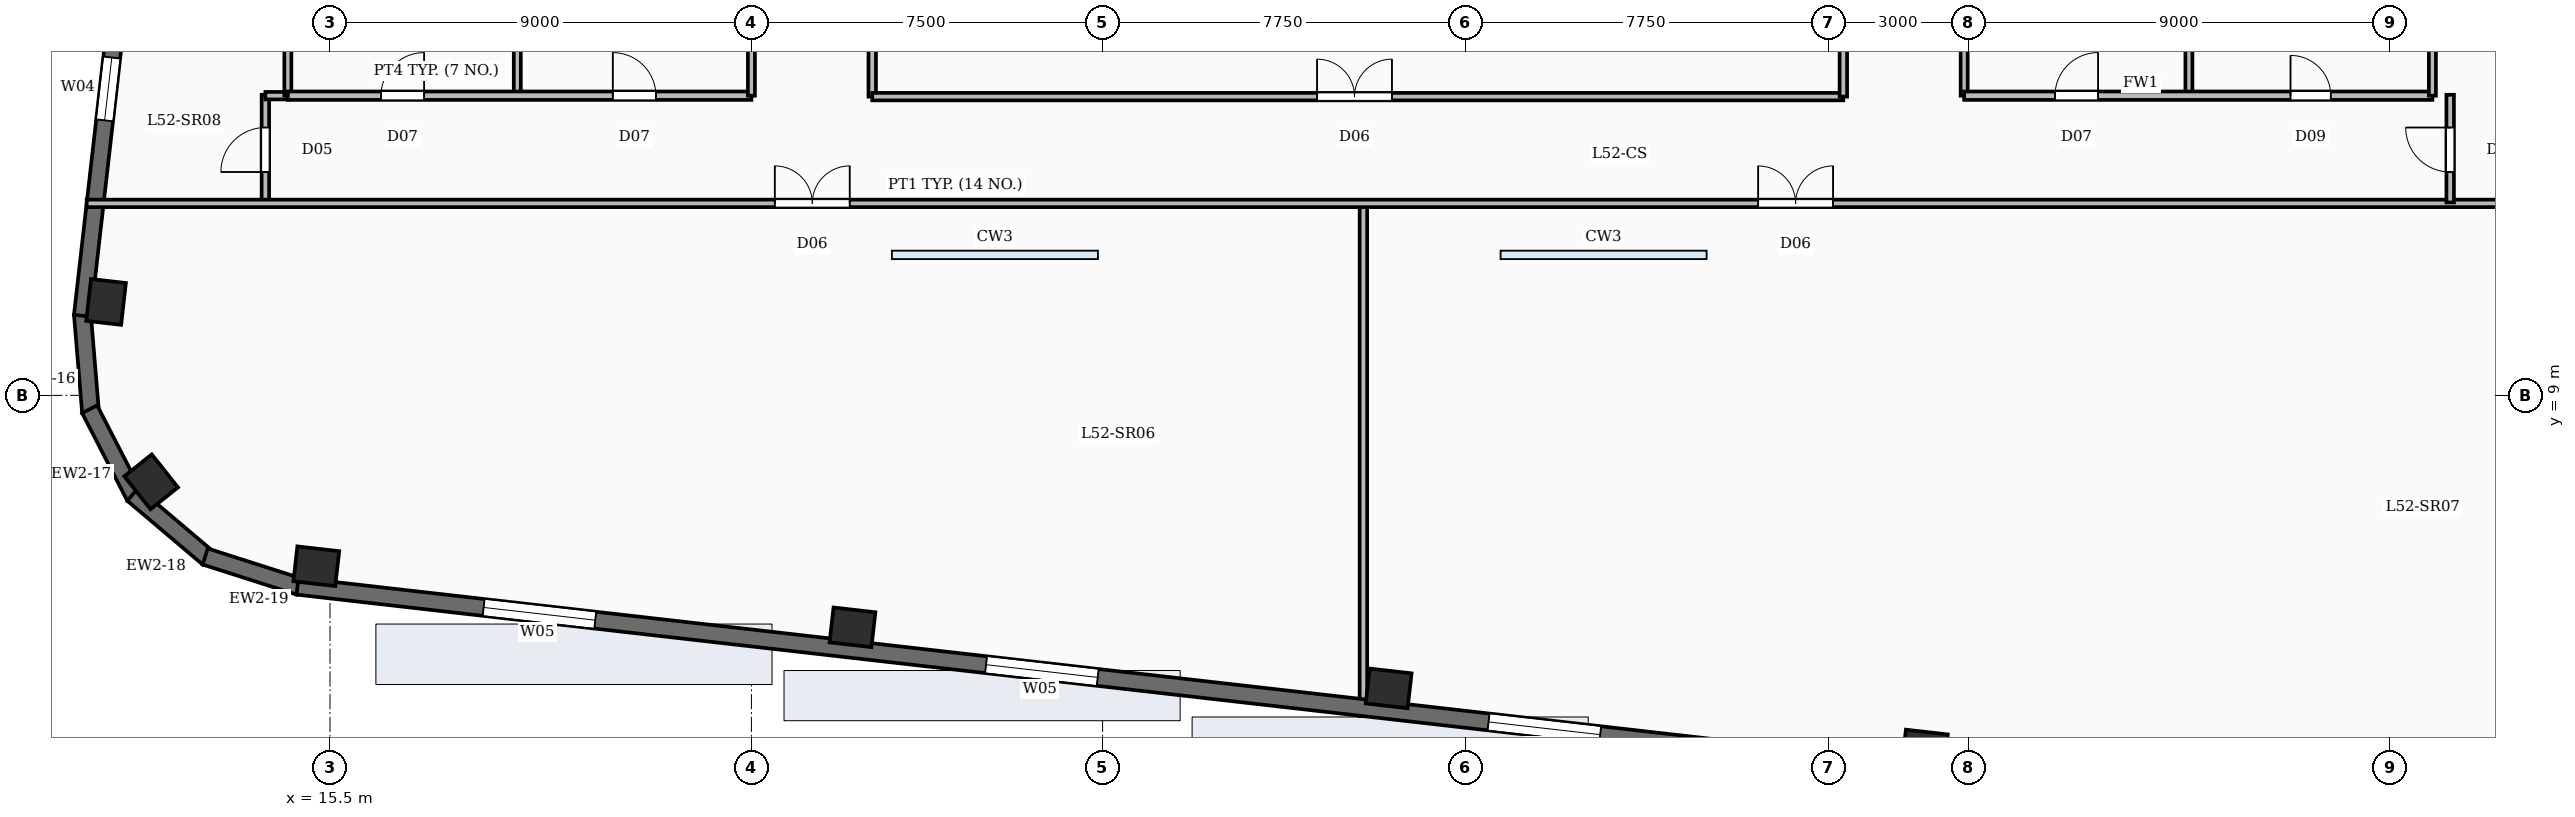
"""IFC4 building model, lengths in metres.
Left out: names, types, materials, properties, quantities, classifications, styles, units other than length and angle.
Written with IfcOpenShell. Run it as: python <this file> out.ifc"""

import sys

from ifc_helpers import new_model, si_unit, direction, frame, frame_2d, origin, origin_2d, place, context, subcontext, project, spatial, rectangle, extrude, element, fill, save


model = new_model("IFC4")
c1 = context("Model", 3, precision=1e-05, world=origin(), true_north=direction((0.0, 1.0)))
c2 = subcontext(c1, "Body", "Model", "MODEL_VIEW")
j1 = project(units=[si_unit("LENGTHUNIT", "METRE"), si_unit("PLANEANGLEUNIT", "RADIAN")], contexts=[c1])
p1 = place(None, origin())
s1 = spatial("IfcSite", under=j1, at=p1, CompositionType="ELEMENT")
p2 = place(p1, origin())
s2 = spatial("IfcBuilding", under=s1, at=p2, CompositionType="ELEMENT")
p3 = place(p2, frame((0.0, 0.0, 216.15)))
s3 = spatial("IfcBuildingStorey", under=s2, at=p3, CompositionType="ELEMENT", Elevation=216.15)
for number, where, z_axis, x_axis in (
    (1, (15.208, 5.351, -0.45), (0.0, 0.0, 1.0), (0.994, -0.113, 0.0)),
    (2, (26.659, 4.046, -0.45), (0.0, 0.0, 1.0), (0.994, -0.113, 0.0)),
    (3, (38.11, 2.741, -0.45), (0.0, 0.0, 1.0), (0.994, -0.113, 0.0)),
    (4, (49.56, 1.437, -0.45), (0.0, 0.0, 1.0), (0.994, -0.113, 0.0)),
    (5, (10.718, 10.995, -0.45), (0.0, 0.0, 1.0), (0.113, 0.994, 0.0)),
    (6, (11.68, 7.153, -0.45), (0.0, 0.0, 1.0), (-0.623, 0.783, 0.0)),
):
    element("IfcColumn", number, at=place(p3, frame(where, z_axis=z_axis, x_axis=x_axis)), inside=s3, PredefinedType="COLUMN", context=c2, shape_type="SweptSolid", body=[
        extrude(rectangle(XDim=0.9, YDim=0.75, at=origin_2d()), origin(), (0.0, 0.0, 1.0), 4.98),
    ])
p4 = place(p3, frame((10.211, 10.701, 0.0), z_axis=(0.0, 0.0, 1.0), x_axis=(0.113203107947, 0.993571867733, 0.0)))
e7 = element("IfcWall", 7, at=p4, inside=s3, PredefinedType="SOLIDWALL", context=c2, shape_type="SweptSolid", body=[
    extrude(rectangle(XDim=34.5, YDim=0.36, at=frame_2d((17.25, 0.0))), origin(), (0.0, 0.0, 1.0), 4.53),
])
p5 = place(p4, frame((4.2, 0.0, 0.88)))
e8 = element("IfcOpeningElement", 8, at=p5, cuts=e7, PredefinedType="OPENING", context=c2, shape_type="SweptSolid", body=[
    extrude(rectangle(XDim=1.35, YDim=2.2, at=frame_2d((0.675, 1.1))), frame((0.0, 0.19, 0.0), z_axis=(0.0, -1.0, 0.0), x_axis=(1.0, 0.0, 0.0)), (0.0, 0.0, 1.0), 0.38),
])
p6 = place(p4, frame((15.4, 0.0, 0.88)))
e9 = element("IfcOpeningElement", 9, at=p6, cuts=e7, PredefinedType="OPENING", context=c2, shape_type="SweptSolid", body=[
    extrude(rectangle(XDim=1.35, YDim=2.2, at=frame_2d((0.675, 1.1))), frame((0.0, 0.19, 0.0), z_axis=(0.0, -1.0, 0.0), x_axis=(1.0, 0.0, 0.0)), (0.0, 0.0, 1.0), 0.38),
])
p7 = place(p4, frame((26.6, 0.0, 0.88)))
e10 = element("IfcOpeningElement", 10, at=p7, cuts=e7, PredefinedType="OPENING", context=c2, shape_type="SweptSolid", body=[
    extrude(rectangle(XDim=1.35, YDim=2.2, at=frame_2d((0.675, 1.1))), frame((0.0, 0.19, 0.0), z_axis=(0.0, -1.0, 0.0), x_axis=(1.0, 0.0, 0.0)), (0.0, 0.0, 1.0), 0.38),
])
p8 = place(p3, frame((10.386, 8.636, 0.0), z_axis=(0.0, 0.0, 1.0), x_axis=(-0.082729038891, 0.996572077737, 0.0)))
e11 = element("IfcWall", 11, at=p8, inside=s3, PredefinedType="SOLIDWALL", context=c2, shape_type="SweptSolid", body=[
    extrude(rectangle(XDim=2.107, YDim=0.36, at=frame_2d((1.054, 0.0))), origin(), (0.0, 0.0, 1.0), 4.53),
])
for number, where, z_axis, x_axis in (
    (12, (11.332, 6.831, 0.0), (0.0, 0.0, 1.0), (-0.458, 0.889, 0.0)),
    (13, (12.896, 5.524, 0.0), (0.0, 0.0, 1.0), (-0.763, 0.646, 0.0)),
    (14, (14.841, 4.916, 0.0), (0.0, 0.0, 1.0), (-0.952, 0.305, 0.0)),
):
    element("IfcWall", number, at=place(p3, frame(where, z_axis=z_axis, x_axis=x_axis)), inside=s3, PredefinedType="SOLIDWALL", context=c2, shape_type="SweptSolid", body=[
        extrude(rectangle(XDim=2.107, YDim=0.36, at=frame_2d((1.053, 0.0))), origin(), (0.0, 0.0, 1.0), 4.53),
    ])
p9 = place(p3, frame((61.306, -0.375, 0.0), z_axis=(0.0, 0.0, 1.0), x_axis=(-0.993571958919, 0.113202307616, 0.0)))
e15 = element("IfcWall", 15, at=p9, inside=s3, PredefinedType="SOLIDWALL", context=c2, shape_type="SweptSolid", body=[
    extrude(rectangle(XDim=46.8, YDim=0.36, at=frame_2d((23.4, 0.0))), origin(), (0.0, 0.0, 1.0), 4.53),
])
p10 = place(p9, frame((2.6, 0.0, 0.85)))
e16 = element("IfcOpeningElement", 16, at=p10, cuts=e15, PredefinedType="OPENING", context=c2, shape_type="SweptSolid", body=[
    extrude(rectangle(XDim=2.4, YDim=3.0, at=frame_2d((1.2, 1.5))), frame((0.0, 0.19, 0.0), z_axis=(0.0, -1.0, 0.0), x_axis=(1.0, 0.0, 0.0)), (0.0, 0.0, 1.0), 0.38),
])
p11 = place(p9, frame((8.0, 0.0, 0.85)))
e17 = element("IfcOpeningElement", 17, at=p11, cuts=e15, PredefinedType="OPENING", context=c2, shape_type="SweptSolid", body=[
    extrude(rectangle(XDim=2.4, YDim=3.0, at=frame_2d((1.2, 1.5))), frame((0.0, 0.19, 0.0), z_axis=(0.0, -1.0, 0.0), x_axis=(1.0, 0.0, 0.0)), (0.0, 0.0, 1.0), 0.38),
])
p12 = place(p9, frame((13.4, 0.0, 0.85)))
e18 = element("IfcOpeningElement", 18, at=p12, cuts=e15, PredefinedType="OPENING", context=c2, shape_type="SweptSolid", body=[
    extrude(rectangle(XDim=2.4, YDim=3.0, at=frame_2d((1.2, 1.5))), frame((0.0, 0.19, 0.0), z_axis=(0.0, -1.0, 0.0), x_axis=(1.0, 0.0, 0.0)), (0.0, 0.0, 1.0), 0.38),
])
p13 = place(p9, frame((18.8, 0.0, 0.85)))
e19 = element("IfcOpeningElement", 19, at=p13, cuts=e15, PredefinedType="OPENING", context=c2, shape_type="SweptSolid", body=[
    extrude(rectangle(XDim=2.4, YDim=3.0, at=frame_2d((1.2, 1.5))), frame((0.0, 0.19, 0.0), z_axis=(0.0, -1.0, 0.0), x_axis=(1.0, 0.0, 0.0)), (0.0, 0.0, 1.0), 0.38),
])
p14 = place(p9, frame((29.6, 0.0, 0.85)))
e20 = element("IfcOpeningElement", 20, at=p14, cuts=e15, PredefinedType="OPENING", context=c2, shape_type="SweptSolid", body=[
    extrude(rectangle(XDim=2.4, YDim=3.0, at=frame_2d((1.2, 1.5))), frame((0.0, 0.19, 0.0), z_axis=(0.0, -1.0, 0.0), x_axis=(1.0, 0.0, 0.0)), (0.0, 0.0, 1.0), 0.38),
])
p15 = place(p9, frame((40.4, 0.0, 0.85)))
e21 = element("IfcOpeningElement", 21, at=p15, cuts=e15, PredefinedType="OPENING", context=c2, shape_type="SweptSolid", body=[
    extrude(rectangle(XDim=2.4, YDim=3.0, at=frame_2d((1.2, 1.5))), frame((0.0, 0.19, 0.0), z_axis=(0.0, -1.0, 0.0), x_axis=(1.0, 0.0, 0.0)), (0.0, 0.0, 1.0), 0.38),
])
p16 = place(p3, frame((19.5, 15.4, 0.0), z_axis=(0.0, 0.0, 1.0), x_axis=(0.0, 1.0, 0.0)))
e22 = element("IfcWall", 22, at=p16, inside=s3, PredefinedType="PARTITIONING", context=c2, shape_type="SweptSolid", body=[
    extrude(rectangle(XDim=3.58, YDim=0.15, at=frame_2d((1.79, 0.0))), origin(), (0.0, 0.0, 1.0), 3.59),
])
p17 = place(p3, frame((14.6, 15.4, 0.0), z_axis=(0.0, 0.0, 1.0), x_axis=(1.0, 0.0, 0.0)))
e23 = element("IfcWall", 23, at=p17, inside=s3, PredefinedType="PARTITIONING", context=c2, shape_type="SweptSolid", body=[
    extrude(rectangle(XDim=9.9, YDim=0.18, at=frame_2d((4.95, 0.0))), origin(), (0.0, 0.0, 1.0), 3.59),
])
p18 = place(p17, frame((1.99, 0.0, 0.0)))
e24 = element("IfcOpeningElement", 24, at=p18, cuts=e23, PredefinedType="OPENING", context=c2, shape_type="SweptSolid", body=[
    extrude(rectangle(XDim=0.92, YDim=2.1, at=frame_2d((0.46, 1.05))), frame((0.0, 0.1, 0.0), z_axis=(0.0, -1.0, 0.0), x_axis=(1.0, 0.0, 0.0)), (0.0, 0.0, 1.0), 0.2),
])
p19 = place(p17, frame((6.94, 0.0, 0.0)))
e25 = element("IfcOpeningElement", 25, at=p19, cuts=e23, PredefinedType="OPENING", context=c2, shape_type="SweptSolid", body=[
    extrude(rectangle(XDim=0.92, YDim=2.1, at=frame_2d((0.46, 1.05))), frame((0.0, 0.1, 0.0), z_axis=(0.0, -1.0, 0.0), x_axis=(1.0, 0.0, 0.0)), (0.0, 0.0, 1.0), 0.2),
])
for number, where, z_axis, x_axis in (
    (26, (14.6, 15.4, 0.0), (0.0, 0.0, 1.0), (0.0, 1.0, 0.0)),
    (27, (24.5, 15.4, 0.0), (0.0, 0.0, 1.0), (0.0, 1.0, 0.0)),
    (28, (55.2, 15.4, 0.0), (0.0, 0.0, 1.0), (0.0, 1.0, 0.0)),
):
    element("IfcWall", number, at=place(p3, frame(where, z_axis=z_axis, x_axis=x_axis)), inside=s3, PredefinedType="PARTITIONING", context=c2, shape_type="SweptSolid", body=[
        extrude(rectangle(XDim=3.58, YDim=0.15, at=frame_2d((1.79, 0.0))), origin(), (0.0, 0.0, 1.0), 3.59),
    ])
p20 = place(p3, frame((50.4, 15.4, 0.0), z_axis=(0.0, 0.0, 1.0), x_axis=(1.0, 0.0, 0.0)))
e29 = element("IfcWall", 29, at=p20, inside=s3, PredefinedType="SOLIDWALL", context=c2, shape_type="SweptSolid", body=[
    extrude(rectangle(XDim=10.0, YDim=0.18, at=frame_2d((5.0, 0.0))), origin(), (0.0, 0.0, 1.0), 3.59),
])
p21 = place(p20, frame((1.94, 0.0, 0.0)))
e30 = element("IfcOpeningElement", 30, at=p21, cuts=e29, PredefinedType="OPENING", context=c2, shape_type="SweptSolid", body=[
    extrude(rectangle(XDim=0.92, YDim=2.1, at=frame_2d((0.46, 1.05))), frame((0.0, 0.1, 0.0), z_axis=(0.0, -1.0, 0.0), x_axis=(1.0, 0.0, 0.0)), (0.0, 0.0, 1.0), 0.2),
])
p22 = place(p20, frame((6.97, 0.0, 0.0)))
e31 = element("IfcOpeningElement", 31, at=p22, cuts=e29, PredefinedType="OPENING", context=c2, shape_type="SweptSolid", body=[
    extrude(rectangle(XDim=0.86, YDim=2.05, at=frame_2d((0.43, 1.025))), frame((0.0, 0.1, 0.0), z_axis=(0.0, -1.0, 0.0), x_axis=(1.0, 0.0, 0.0)), (0.0, 0.0, 1.0), 0.2),
])
for number, where, z_axis, x_axis in (
    (32, (50.4, 15.4, 0.0), (0.0, 0.0, 1.0), (0.0, 1.0, 0.0)),
    (33, (60.4, 15.4, 0.0), (0.0, 0.0, 1.0), (0.0, 1.0, 0.0)),
):
    element("IfcWall", number, at=place(p3, frame(where, z_axis=z_axis, x_axis=x_axis)), inside=s3, PredefinedType="PARTITIONING", context=c2, shape_type="SweptSolid", body=[
        extrude(rectangle(XDim=3.58, YDim=0.15, at=frame_2d((1.79, 0.0))), origin(), (0.0, 0.0, 1.0), 3.59),
    ])
p23 = place(p3, frame((27.08, 15.38, 0.0), z_axis=(0.0, 0.0, 1.0), x_axis=(1.0, 0.0, 0.0)))
e34 = element("IfcWall", 34, at=p23, inside=s3, PredefinedType="PARTITIONING", context=c2, shape_type="SweptSolid", body=[
    extrude(rectangle(XDim=20.74, YDim=0.16, at=frame_2d((10.37, 0.0))), origin(), (0.0, 0.0, 1.0), 3.59),
])
p24 = place(p23, frame((9.5, 0.0, 0.0)))
e35 = element("IfcOpeningElement", 35, at=p24, cuts=e34, PredefinedType="OPENING", context=c2, shape_type="SweptSolid", body=[
    extrude(rectangle(XDim=1.6, YDim=2.15, at=frame_2d((0.8, 1.075))), frame((0.0, 0.09, 0.0), z_axis=(0.0, -1.0, 0.0), x_axis=(1.0, 0.0, 0.0)), (0.0, 0.0, 1.0), 0.18),
])
for number, where, z_axis, x_axis in (
    (36, (27.08, 15.38, 0.0), (0.0, 0.0, 1.0), (0.0, 1.0, 0.0)),
    (37, (47.82, 15.38, 0.0), (0.0, 0.0, 1.0), (0.0, 1.0, 0.0)),
):
    element("IfcWall", number, at=place(p3, frame(where, z_axis=z_axis, x_axis=x_axis)), inside=s3, PredefinedType="PARTITIONING", context=c2, shape_type="SweptSolid", body=[
        extrude(rectangle(XDim=20.2, YDim=0.16, at=frame_2d((10.1, 0.0))), origin(), (0.0, 0.0, 1.0), 3.59),
    ])
p25 = place(p3, frame((14.12, 15.4, 0.0), z_axis=(0.0, 0.0, 1.0), x_axis=(1.0, 0.0, 0.0)))
e38 = element("IfcWall", 38, at=p25, inside=s3, PredefinedType="PARTITIONING", context=c2, shape_type="SweptSolid", body=[
    extrude(rectangle(XDim=0.5, YDim=0.16, at=frame_2d((0.25, 0.0))), origin(), (0.0, 0.0, 1.0), 3.59),
])
p26 = place(p3, frame((10.303, 13.1, 0.0), z_axis=(0.0, 0.0, 1.0), x_axis=(1.0, 0.0, 0.0)))
e39 = element("IfcWall", 39, at=p26, inside=s3, PredefinedType="PARTITIONING", context=c2, shape_type="SweptSolid", body=[
    extrude(rectangle(XDim=57.973, YDim=0.16, at=frame_2d((28.986, 0.0))), origin(), (0.0, 0.0, 1.0), 3.59),
])
p27 = place(p26, frame((14.697, 0.0, 0.0)))
e40 = element("IfcOpeningElement", 40, at=p27, cuts=e39, PredefinedType="OPENING", context=c2, shape_type="SweptSolid", body=[
    extrude(rectangle(XDim=1.6, YDim=2.15, at=frame_2d((0.8, 1.075))), frame((0.0, 0.09, 0.0), z_axis=(0.0, -1.0, 0.0), x_axis=(1.0, 0.0, 0.0)), (0.0, 0.0, 1.0), 0.18),
])
p28 = place(p26, frame((35.697, 0.0, 0.0)))
e41 = element("IfcOpeningElement", 41, at=p28, cuts=e39, PredefinedType="OPENING", context=c2, shape_type="SweptSolid", body=[
    extrude(rectangle(XDim=1.6, YDim=2.15, at=frame_2d((0.8, 1.075))), frame((0.0, 0.09, 0.0), z_axis=(0.0, -1.0, 0.0), x_axis=(1.0, 0.0, 0.0)), (0.0, 0.0, 1.0), 0.18),
])
p29 = place(p3, frame((37.57, 2.149, 0.0), z_axis=(0.0, 0.0, 1.0), x_axis=(0.0, 1.0, 0.0)))
e42 = element("IfcWall", 42, at=p29, inside=s3, PredefinedType="PARTITIONING", context=c2, shape_type="SweptSolid", body=[
    extrude(rectangle(XDim=10.951, YDim=0.16, at=frame_2d((5.476, 0.0))), origin(), (0.0, 0.0, 1.0), 3.59),
])
p30 = place(p3, frame((14.12, 13.12, 0.0), z_axis=(0.0, 0.0, 1.0), x_axis=(0.0, 1.0, 0.0)))
e43 = element("IfcWall", 43, at=p30, inside=s3, PredefinedType="PARTITIONING", context=c2, shape_type="SweptSolid", body=[
    extrude(rectangle(XDim=2.3, YDim=0.16, at=frame_2d((1.15, 0.0))), origin(), (0.0, 0.0, 1.0), 3.59),
])
p31 = place(p30, frame((0.65, 0.0, 0.0)))
e44 = element("IfcOpeningElement", 44, at=p31, cuts=e43, PredefinedType="OPENING", context=c2, shape_type="SweptSolid", body=[
    extrude(rectangle(XDim=0.95, YDim=2.15, at=frame_2d((0.475, 1.075))), frame((0.0, 0.09, 0.0), z_axis=(0.0, -1.0, 0.0), x_axis=(1.0, 0.0, 0.0)), (0.0, 0.0, 1.0), 0.18),
])
p32 = place(p3, frame((60.78, 13.12, 0.0), z_axis=(0.0, 0.0, 1.0), x_axis=(0.0, 1.0, 0.0)))
e45 = element("IfcWall", 45, at=p32, inside=s3, PredefinedType="PARTITIONING", context=c2, shape_type="SweptSolid", body=[
    extrude(rectangle(XDim=2.3, YDim=0.16, at=frame_2d((1.15, 0.0))), origin(), (0.0, 0.0, 1.0), 3.59),
])
p33 = place(p32, frame((0.65, 0.0, 0.0)))
e46 = element("IfcOpeningElement", 46, at=p33, cuts=e45, PredefinedType="OPENING", context=c2, shape_type="SweptSolid", body=[
    extrude(rectangle(XDim=0.95, YDim=2.15, at=frame_2d((0.475, 1.075))), frame((0.0, 0.09, 0.0), z_axis=(0.0, -1.0, 0.0), x_axis=(1.0, 0.0, 0.0)), (0.0, 0.0, 1.0), 0.18),
])
p34 = place(p5, origin())
e47 = element("IfcWindow", 47, at=p34, inside=s3, PartitioningType="SINGLE_PANEL", PredefinedType="WINDOW", context=c2, shape_type="SweptSolid", body=[
    extrude(rectangle(XDim=1.35, YDim=2.2, at=frame_2d((0.675, 1.1))), frame((0.0, 0.03, 0.0), z_axis=(0.0, -1.0, 0.0), x_axis=(1.0, 0.0, 0.0)), (0.0, 0.0, 1.0), 0.06),
])
fill(e8, e47)
p35 = place(p13, origin())
e48 = element("IfcWindow", 48, at=p35, inside=s3, PartitioningType="DOUBLE_PANEL_VERTICAL", PredefinedType="WINDOW", context=c2, shape_type="SweptSolid", body=[
    extrude(rectangle(XDim=2.4, YDim=3.0, at=frame_2d((1.2, 1.5))), frame((0.0, 0.03, 0.0), z_axis=(0.0, -1.0, 0.0), x_axis=(1.0, 0.0, 0.0)), (0.0, 0.0, 1.0), 0.06),
])
fill(e19, e48)
p36 = place(p14, origin())
e49 = element("IfcWindow", 49, at=p36, inside=s3, PartitioningType="DOUBLE_PANEL_VERTICAL", PredefinedType="WINDOW", context=c2, shape_type="SweptSolid", body=[
    extrude(rectangle(XDim=2.4, YDim=3.0, at=frame_2d((1.2, 1.5))), frame((0.0, 0.03, 0.0), z_axis=(0.0, -1.0, 0.0), x_axis=(1.0, 0.0, 0.0)), (0.0, 0.0, 1.0), 0.06),
])
fill(e20, e49)
p37 = place(p15, origin())
e50 = element("IfcWindow", 50, at=p37, inside=s3, PartitioningType="DOUBLE_PANEL_VERTICAL", PredefinedType="WINDOW", context=c2, shape_type="SweptSolid", body=[
    extrude(rectangle(XDim=2.4, YDim=3.0, at=frame_2d((1.2, 1.5))), frame((0.0, 0.03, 0.0), z_axis=(0.0, -1.0, 0.0), x_axis=(1.0, 0.0, 0.0)), (0.0, 0.0, 1.0), 0.06),
])
fill(e21, e50)
p38 = place(p18, origin())
e51 = element("IfcDoor", 51, at=p38, inside=s3, OperationType="SINGLE_SWING_RIGHT", PredefinedType="DOOR", context=c2, shape_type="SweptSolid", body=[
    extrude(rectangle(XDim=0.92, YDim=2.1, at=frame_2d((0.46, 1.05))), frame((0.0, 0.025, 0.0), z_axis=(0.0, -1.0, 0.0), x_axis=(1.0, 0.0, 0.0)), (0.0, 0.0, 1.0), 0.05),
])
fill(e24, e51)
p39 = place(p19, origin())
e52 = element("IfcDoor", 52, at=p39, inside=s3, OperationType="SINGLE_SWING_LEFT", PredefinedType="DOOR", context=c2, shape_type="SweptSolid", body=[
    extrude(rectangle(XDim=0.92, YDim=2.1, at=frame_2d((0.46, 1.05))), frame((0.0, 0.025, 0.0), z_axis=(0.0, -1.0, 0.0), x_axis=(1.0, 0.0, 0.0)), (0.0, 0.0, 1.0), 0.05),
])
fill(e25, e52)
p40 = place(p21, origin())
e53 = element("IfcDoor", 53, at=p40, inside=s3, OperationType="SINGLE_SWING_RIGHT", PredefinedType="DOOR", context=c2, shape_type="SweptSolid", body=[
    extrude(rectangle(XDim=0.92, YDim=2.1, at=frame_2d((0.46, 1.05))), frame((0.0, 0.025, 0.0), z_axis=(0.0, -1.0, 0.0), x_axis=(1.0, 0.0, 0.0)), (0.0, 0.0, 1.0), 0.05),
])
fill(e30, e53)
p41 = place(p22, origin())
e54 = element("IfcDoor", 54, at=p41, inside=s3, OperationType="SINGLE_SWING_LEFT", PredefinedType="DOOR", context=c2, shape_type="SweptSolid", body=[
    extrude(rectangle(XDim=0.86, YDim=2.05, at=frame_2d((0.43, 1.025))), frame((0.0, 0.025, 0.0), z_axis=(0.0, -1.0, 0.0), x_axis=(1.0, 0.0, 0.0)), (0.0, 0.0, 1.0), 0.05),
])
fill(e31, e54)
p42 = place(p24, origin())
e55 = element("IfcDoor", 55, at=p42, inside=s3, OperationType="DOUBLE_DOOR_SINGLE_SWING", PredefinedType="DOOR", context=c2, shape_type="SweptSolid", body=[
    extrude(rectangle(XDim=1.6, YDim=2.15, at=frame_2d((0.8, 1.075))), frame((0.0, 0.025, 0.0), z_axis=(0.0, -1.0, 0.0), x_axis=(1.0, 0.0, 0.0)), (0.0, 0.0, 1.0), 0.05),
])
fill(e35, e55)
p43 = place(p27, origin())
e56 = element("IfcDoor", 56, at=p43, inside=s3, OperationType="DOUBLE_DOOR_SINGLE_SWING", PredefinedType="DOOR", context=c2, shape_type="SweptSolid", body=[
    extrude(rectangle(XDim=1.6, YDim=2.15, at=frame_2d((0.8, 1.075))), frame((0.0, 0.025, 0.0), z_axis=(0.0, -1.0, 0.0), x_axis=(1.0, 0.0, 0.0)), (0.0, 0.0, 1.0), 0.05),
])
fill(e40, e56)
p44 = place(p28, origin())
e57 = element("IfcDoor", 57, at=p44, inside=s3, OperationType="DOUBLE_DOOR_SINGLE_SWING", PredefinedType="DOOR", context=c2, shape_type="SweptSolid", body=[
    extrude(rectangle(XDim=1.6, YDim=2.15, at=frame_2d((0.8, 1.075))), frame((0.0, 0.025, 0.0), z_axis=(0.0, -1.0, 0.0), x_axis=(1.0, 0.0, 0.0)), (0.0, 0.0, 1.0), 0.05),
])
fill(e41, e57)
p45 = place(p31, origin())
e58 = element("IfcDoor", 58, at=p45, inside=s3, OperationType="SINGLE_SWING_LEFT", PredefinedType="DOOR", context=c2, shape_type="SweptSolid", body=[
    extrude(rectangle(XDim=0.95, YDim=2.15, at=frame_2d((0.475, 1.075))), frame((0.0, 0.025, 0.0), z_axis=(0.0, -1.0, 0.0), x_axis=(1.0, 0.0, 0.0)), (0.0, 0.0, 1.0), 0.05),
])
fill(e44, e58)
p46 = place(p33, origin())
e59 = element("IfcDoor", 59, at=p46, inside=s3, OperationType="SINGLE_SWING_RIGHT", PredefinedType="DOOR", context=c2, shape_type="SweptSolid", body=[
    extrude(rectangle(XDim=0.95, YDim=2.15, at=frame_2d((0.475, 1.075))), frame((0.0, 0.025, 0.0), z_axis=(0.0, -1.0, 0.0), x_axis=(1.0, 0.0, 0.0)), (0.0, 0.0, 1.0), 0.05),
])
fill(e46, e59)
save(model, sys.argv[1])
